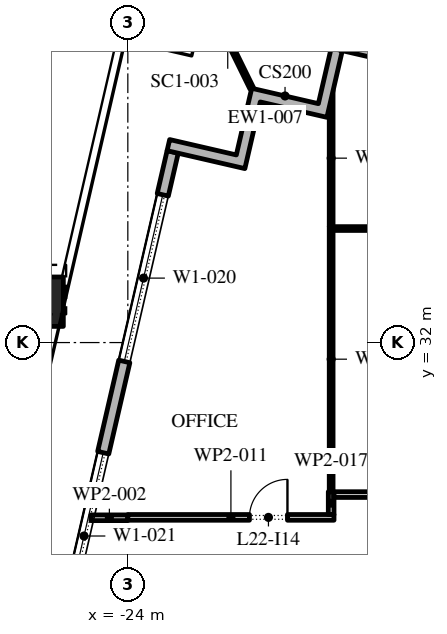
"""IFC4 building model, lengths in metres.
Left out: names, types, materials, properties, quantities, classifications, styles, units other than length and angle.
Written with IfcOpenShell. Run it as: python <this file> out.ifc"""

import sys

from ifc_helpers import new_model, si_unit, direction, frame, frame_2d, origin, origin_2d, place, context, subcontext, project, spatial, polyline, rectangle, outline, extrude, element, fill, save


model = new_model("IFC4")
c1 = context("Model", 3, precision=1e-05, world=origin(), true_north=direction((0.0, 1.0)))
c2 = subcontext(c1, "Body", "Model", "MODEL_VIEW")
j1 = project(units=[si_unit("LENGTHUNIT", "METRE"), si_unit("PLANEANGLEUNIT", "RADIAN")], contexts=[c1])
p1 = place(None, origin())
s1 = spatial("IfcSite", under=j1, at=p1, CompositionType="ELEMENT")
p2 = place(p1, origin())
s2 = spatial("IfcBuilding", under=s1, at=p2, CompositionType="ELEMENT")
p3 = place(p2, frame((0.0, 0.0, 105.6)))
s3 = spatial("IfcBuildingStorey", under=s2, at=p3, CompositionType="ELEMENT", Elevation=105.6)
p4 = place(p3, frame((-26.347, 33.075, 0.0), z_axis=(0.017502025619, 0.075687567741, 0.996977969259), x_axis=(-0.974290512438, 0.225295355862, 0.0)))
e1 = element("IfcColumn", 1, at=p4, inside=s3, PredefinedType="COLUMN", context=c2, shape_type="SweptSolid", body=[
    extrude(rectangle(XDim=1.3, YDim=1.3, at=origin_2d()), origin(), (0.0, 0.0, 1.0), 4.213),
])
p5 = place(p3, frame((31.078, 28.421, 0.0), z_axis=(0.0, 0.0, 1.0), x_axis=(-0.974370456532, 0.224949357493, 0.0)))
e2 = element("IfcWall", 2, at=p5, inside=s3, PredefinedType="STANDARD", context=c2, shape_type="SweptSolid", body=[
    extrude(rectangle(XDim=51.0, YDim=0.3, at=frame_2d((25.5, 0.0))), origin(), (0.0, 0.0, 1.0), 4.0),
])
p6 = place(p5, frame((1.875, 0.0, 0.45)))
e3 = element("IfcOpeningElement", 3, at=p6, cuts=e2, PredefinedType="OPENING", context=c2, shape_type="SweptSolid", body=[
    extrude(rectangle(XDim=4.5, YDim=3.05, at=frame_2d((2.25, 1.525))), frame((0.0, 0.16, 0.0), z_axis=(0.0, -1.0, 0.0), x_axis=(1.0, 0.0, 0.0)), (0.0, 0.0, 1.0), 0.32),
])
p7 = place(p5, frame((10.275, 0.0, 0.45)))
e4 = element("IfcOpeningElement", 4, at=p7, cuts=e2, PredefinedType="OPENING", context=c2, shape_type="SweptSolid", body=[
    extrude(rectangle(XDim=4.5, YDim=2.95, at=frame_2d((2.25, 1.475))), frame((0.0, 0.16, 0.0), z_axis=(0.0, -1.0, 0.0), x_axis=(1.0, 0.0, 0.0)), (0.0, 0.0, 1.0), 0.32),
])
p8 = place(p5, frame((18.825, 0.0, 0.45)))
e5 = element("IfcOpeningElement", 5, at=p8, cuts=e2, PredefinedType="OPENING", context=c2, shape_type="SweptSolid", body=[
    extrude(rectangle(XDim=4.5, YDim=2.875, at=frame_2d((2.25, 1.438))), frame((0.0, 0.16, 0.0), z_axis=(0.0, -1.0, 0.0), x_axis=(1.0, 0.0, 0.0)), (0.0, 0.0, 1.0), 0.32),
])
p9 = place(p5, frame((27.075, 0.0, 0.0)))
e6 = element("IfcOpeningElement", 6, at=p9, cuts=e2, PredefinedType="OPENING", context=c2, shape_type="SweptSolid", body=[
    extrude(rectangle(XDim=2.4, YDim=3.25, at=frame_2d((1.2, 1.625))), frame((0.0, 0.16, 0.0), z_axis=(0.0, -1.0, 0.0), x_axis=(1.0, 0.0, 0.0)), (0.0, 0.0, 1.0), 0.32),
])
p10 = place(p5, frame((35.925, 0.0, 0.45)))
e7 = element("IfcOpeningElement", 7, at=p10, cuts=e2, PredefinedType="OPENING", context=c2, shape_type="SweptSolid", body=[
    extrude(rectangle(XDim=4.5, YDim=2.675, at=frame_2d((2.25, 1.337))), frame((0.0, 0.16, 0.0), z_axis=(0.0, -1.0, 0.0), x_axis=(1.0, 0.0, 0.0)), (0.0, 0.0, 1.0), 0.32),
])
p11 = place(p5, frame((44.475, 0.0, 0.45)))
e8 = element("IfcOpeningElement", 8, at=p11, cuts=e2, PredefinedType="OPENING", context=c2, shape_type="SweptSolid", body=[
    extrude(rectangle(XDim=4.5, YDim=2.575, at=frame_2d((2.25, 1.288))), frame((0.0, 0.16, 0.0), z_axis=(0.0, -1.0, 0.0), x_axis=(1.0, 0.0, 0.0)), (0.0, 0.0, 1.0), 0.32),
])
p12 = place(p3, frame((-22.82, 37.016, 0.0), z_axis=(0.0, 0.0, 1.0), x_axis=(-0.224953880882, -0.974369412223, 0.0)))
e9 = element("IfcWall", 9, at=p12, inside=s3, PredefinedType="STANDARD", context=c2, shape_type="SweptSolid", body=[
    extrude(rectangle(XDim=49.5, YDim=0.3, at=frame_2d((24.75, 0.0))), origin(), (0.0, 0.0, 1.0), 4.0),
])
p13 = place(p12, frame((1.157, 0.0, 0.45)))
e10 = element("IfcOpeningElement", 10, at=p13, cuts=e9, PredefinedType="OPENING", context=c2, shape_type="SweptSolid", body=[
    extrude(rectangle(XDim=4.5, YDim=3.05, at=frame_2d((2.25, 1.525))), frame((0.0, 0.16, 0.0), z_axis=(0.0, -1.0, 0.0), x_axis=(1.0, 0.0, 0.0)), (0.0, 0.0, 1.0), 0.32),
])
p14 = place(p12, frame((8.121, 0.0, 0.45)))
e11 = element("IfcOpeningElement", 11, at=p14, cuts=e9, PredefinedType="OPENING", context=c2, shape_type="SweptSolid", body=[
    extrude(rectangle(XDim=4.5, YDim=3.05, at=frame_2d((2.25, 1.525))), frame((0.0, 0.16, 0.0), z_axis=(0.0, -1.0, 0.0), x_axis=(1.0, 0.0, 0.0)), (0.0, 0.0, 1.0), 0.32),
])
p15 = place(p12, frame((15.236, 0.0, 0.45)))
e12 = element("IfcOpeningElement", 12, at=p15, cuts=e9, PredefinedType="OPENING", context=c2, shape_type="SweptSolid", body=[
    extrude(rectangle(XDim=4.5, YDim=3.05, at=frame_2d((2.25, 1.525))), frame((0.0, 0.16, 0.0), z_axis=(0.0, -1.0, 0.0), x_axis=(1.0, 0.0, 0.0)), (0.0, 0.0, 1.0), 0.32),
])
p16 = place(p12, frame((23.4, 0.0, 0.0)))
e13 = element("IfcOpeningElement", 13, at=p16, cuts=e9, PredefinedType="OPENING", context=c2, shape_type="SweptSolid", body=[
    extrude(rectangle(XDim=2.4, YDim=3.5, at=frame_2d((1.2, 1.75))), frame((0.0, 0.16, 0.0), z_axis=(0.0, -1.0, 0.0), x_axis=(1.0, 0.0, 0.0)), (0.0, 0.0, 1.0), 0.32),
])
p17 = place(p12, frame((29.464, 0.0, 0.45)))
e14 = element("IfcOpeningElement", 14, at=p17, cuts=e9, PredefinedType="OPENING", context=c2, shape_type="SweptSolid", body=[
    extrude(rectangle(XDim=4.5, YDim=2.875, at=frame_2d((2.25, 1.438))), frame((0.0, 0.16, 0.0), z_axis=(0.0, -1.0, 0.0), x_axis=(1.0, 0.0, 0.0)), (0.0, 0.0, 1.0), 0.32),
])
p18 = place(p12, frame((36.579, 0.0, 0.45)))
e15 = element("IfcOpeningElement", 15, at=p18, cuts=e9, PredefinedType="OPENING", context=c2, shape_type="SweptSolid", body=[
    extrude(rectangle(XDim=4.5, YDim=2.675, at=frame_2d((2.25, 1.337))), frame((0.0, 0.16, 0.0), z_axis=(0.0, -1.0, 0.0), x_axis=(1.0, 0.0, 0.0)), (0.0, 0.0, 1.0), 0.32),
])
p19 = place(p12, frame((43.693, 0.0, 0.45)))
e16 = element("IfcOpeningElement", 16, at=p19, cuts=e9, PredefinedType="OPENING", context=c2, shape_type="SweptSolid", body=[
    extrude(rectangle(XDim=4.5, YDim=3.05, at=frame_2d((2.25, 1.525))), frame((0.0, 0.16, 0.0), z_axis=(0.0, -1.0, 0.0), x_axis=(1.0, 0.0, 0.0)), (0.0, 0.0, 1.0), 0.32),
])
p20 = place(p3, origin())
e17 = element("IfcWall", 17, at=p20, inside=s3, PredefinedType="STANDARD", context=c2, shape_type="SweptSolid", body=[
    extrude(outline(polyline([(-22.967, 37.049), (-22.899, 37.342), (-21.145, 36.937), (-20.74, 38.691), (-18.986, 38.286), (-18.649, 39.747), (-18.357, 39.68), (-18.762, 37.926), (-20.515, 38.331), (-20.92, 36.577), (-22.967, 37.049)])), origin(), (0.0, 0.0, 1.0), 4.0),
])
p21 = place(p3, frame((-20.74, 38.691, -0.05), z_axis=(0.0, 0.0, 1.0), x_axis=(-0.441125841368, 0.897445258541, 0.0)))
e18 = element("IfcWall", 18, at=p21, inside=s3, PredefinedType="STANDARD", context=c2, shape_type="SweptSolid", body=[
    extrude(rectangle(XDim=2.86, YDim=0.1, at=frame_2d((1.43, 0.0))), origin(), (0.0, 0.0, 1.0), 4.05),
])
p22 = place(p3, frame((-24.971, 27.39, 0.0), z_axis=(0.0, 0.0, 1.0), x_axis=(1.0, 0.0, 0.0)))
e19 = element("IfcWall", 19, at=p22, inside=s3, PredefinedType="PARTITIONING", context=c2, shape_type="SweptSolid", body=[
    extrude(rectangle(XDim=0.971, YDim=0.15, at=frame_2d((0.485, 0.0))), origin(), (0.0, 0.0, 1.0), 4.0),
])
p23 = place(p3, frame((-24.0, 27.4, 0.0), z_axis=(0.0, 0.0, 1.0), x_axis=(1.0, 0.0, 0.0)))
e20 = element("IfcWall", 20, at=p23, inside=s3, PredefinedType="PARTITIONING", context=c2, shape_type="SweptSolid", body=[
    extrude(rectangle(XDim=5.425, YDim=0.15, at=frame_2d((2.712, 0.0))), origin(), (0.0, 0.0, 1.0), 4.0),
])
p24 = place(p23, frame((3.2, 0.0, 0.0)))
e21 = element("IfcOpeningElement", 21, at=p24, cuts=e20, PredefinedType="OPENING", context=c2, shape_type="SweptSolid", body=[
    extrude(rectangle(XDim=1.0, YDim=2.1, at=frame_2d((0.5, 1.05))), frame((0.0, 0.085, 0.0), z_axis=(0.0, -1.0, 0.0), x_axis=(1.0, 0.0, 0.0)), (0.0, 0.0, 1.0), 0.17),
])
p25 = place(p3, frame((-18.65, 27.475, 0.0), z_axis=(0.0, 0.0, 1.0), x_axis=(0.0, 1.0, 0.0)))
e22 = element("IfcWall", 22, at=p25, inside=s3, PredefinedType="PARTITIONING", context=c2, shape_type="SweptSolid", body=[
    extrude(rectangle(XDim=0.6, YDim=0.15, at=frame_2d((0.3, 0.0))), origin(), (0.0, 0.0, 1.0), 4.0),
])
p26 = place(p3, frame((-18.65, 28.075, 0.0), z_axis=(0.0, 0.0, 1.0), x_axis=(0.0, 1.0, 0.0)))
e23 = element("IfcWall", 23, at=p26, inside=s3, PredefinedType="PARTITIONING", context=c2, shape_type="SweptSolid", body=[
    extrude(rectangle(XDim=6.975, YDim=0.1, at=frame_2d((3.488, 0.0))), origin(), (0.0, 0.0, 1.0), 4.0),
])
p27 = place(p3, frame((-18.575, 28.0, 0.0), z_axis=(0.0, 0.0, 1.0), x_axis=(1.0, 0.0, 0.0)))
e24 = element("IfcWall", 24, at=p27, inside=s3, PredefinedType="PARTITIONING", context=c2, shape_type="SweptSolid", body=[
    extrude(rectangle(XDim=8.305, YDim=0.15, at=frame_2d((4.152, 0.0))), origin(), (0.0, 0.0, 1.0), 4.0),
])
p28 = place(p27, frame((1.855, 0.0, 0.0)))
e25 = element("IfcOpeningElement", 25, at=p28, cuts=e24, PredefinedType="OPENING", context=c2, shape_type="SweptSolid", body=[
    extrude(rectangle(XDim=1.0, YDim=2.1, at=frame_2d((0.5, 1.05))), frame((0.0, 0.085, 0.0), z_axis=(0.0, -1.0, 0.0), x_axis=(1.0, 0.0, 0.0)), (0.0, 0.0, 1.0), 0.17),
])
p29 = place(p3, frame((-18.65, 35.05, 0.0), z_axis=(0.0, 0.0, 1.0), x_axis=(0.0, 1.0, 0.0)))
e26 = element("IfcWall", 26, at=p29, inside=s3, PredefinedType="PARTITIONING", context=c2, shape_type="SweptSolid", body=[
    extrude(rectangle(XDim=3.604, YDim=0.1, at=frame_2d((1.802, 0.0))), origin(), (0.0, 0.0, 1.0), 4.0),
])
p30 = place(p3, frame((-18.6, 35.0, 0.0), z_axis=(0.0, 0.0, 1.0), x_axis=(1.0, 0.0, 0.0)))
e27 = element("IfcWall", 27, at=p30, inside=s3, PredefinedType="PARTITIONING", context=c2, shape_type="SweptSolid", body=[
    extrude(rectangle(XDim=8.33, YDim=0.1, at=frame_2d((4.165, 0.0))), origin(), (0.0, 0.0, 1.0), 4.0),
])
p31 = place(p30, frame((5.43, 0.0, 0.0)))
e28 = element("IfcOpeningElement", 28, at=p31, cuts=e27, PredefinedType="OPENING", context=c2, shape_type="SweptSolid", body=[
    extrude(rectangle(XDim=0.9, YDim=2.1, at=frame_2d((0.45, 1.05))), frame((0.0, 0.06, 0.0), z_axis=(0.0, -1.0, 0.0), x_axis=(1.0, 0.0, 0.0)), (0.0, 0.0, 1.0), 0.12),
])
p32 = place(p13, origin())
e29 = element("IfcWindow", 29, at=p32, inside=s3, PartitioningType="DOUBLE_PANEL_VERTICAL", PredefinedType="WINDOW", context=c2, shape_type="SweptSolid", body=[
    extrude(rectangle(XDim=4.5, YDim=3.05, at=frame_2d((2.25, 1.525))), frame((0.0, 0.03, 0.0), z_axis=(0.0, -1.0, 0.0), x_axis=(1.0, 0.0, 0.0)), (0.0, 0.0, 1.0), 0.06),
])
fill(e10, e29)
p33 = place(p14, origin())
e30 = element("IfcWindow", 30, at=p33, inside=s3, PartitioningType="DOUBLE_PANEL_VERTICAL", PredefinedType="WINDOW", context=c2, shape_type="SweptSolid", body=[
    extrude(rectangle(XDim=4.5, YDim=3.05, at=frame_2d((2.25, 1.525))), frame((0.0, 0.03, 0.0), z_axis=(0.0, -1.0, 0.0), x_axis=(1.0, 0.0, 0.0)), (0.0, 0.0, 1.0), 0.06),
])
fill(e11, e30)
p34 = place(p24, origin())
e31 = element("IfcDoor", 31, at=p34, inside=s3, OperationType="SINGLE_SWING_LEFT", PredefinedType="DOOR", context=c2, shape_type="SweptSolid", body=[
    extrude(rectangle(XDim=1.0, YDim=2.1, at=frame_2d((0.5, 1.05))), frame((0.0, 0.025, 0.0), z_axis=(0.0, -1.0, 0.0), x_axis=(1.0, 0.0, 0.0)), (0.0, 0.0, 1.0), 0.05),
])
fill(e21, e31)
save(model, sys.argv[1])
